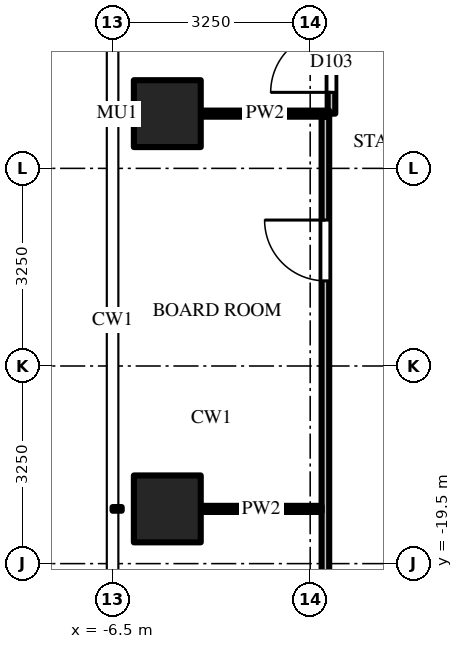
"""IFC4 building model, lengths in metres.
Left out: names, types, materials, properties, quantities, classifications, styles, units other than length and angle.
Written with IfcOpenShell. Run it as: python <this file> out.ifc"""

import sys

from ifc_helpers import new_model, si_unit, direction, frame, frame_2d, origin, origin_2d, place, context, subcontext, project, spatial, rectangle, extrude, source, transform, mapped, element, fill, save


model = new_model("IFC4")
c1 = context("Model", 3, precision=1e-05, world=origin(), true_north=direction((0.0, 1.0)))
c2 = subcontext(c1, "Body", "Model", "MODEL_VIEW")
j1 = project(units=[si_unit("LENGTHUNIT", "METRE"), si_unit("PLANEANGLEUNIT", "RADIAN")], contexts=[c1])
p1 = place(None, origin())
s1 = spatial("IfcSite", under=j1, at=p1, CompositionType="ELEMENT")
p2 = place(p1, origin())
s2 = spatial("IfcBuilding", under=s1, at=p2, CompositionType="ELEMENT")
p3 = place(p2, frame((0.0, 0.0, 232.4)))
s3 = spatial("IfcBuildingStorey", under=s2, at=p3, CompositionType="ELEMENT", Elevation=232.4)
m1 = source(origin(), c2, "Body", "SweptSolid", [
    extrude(rectangle(XDim=1.1, YDim=1.1, at=origin_2d()), origin(), (0.0, 0.0, 1.0), 3.9),
])
for number, where, z_axis, x_axis in (
    (1, (-5.6, -12.1, 0.0), (0.0, 0.0, 1.0), (1.0, 0.0, 0.0)),
    (2, (-5.6, -18.6, 0.0), (0.0, 0.0, 1.0), (1.0, 0.0, 0.0)),
):
    element("IfcColumn", number, at=place(p3, frame(where, z_axis=z_axis, x_axis=x_axis)), inside=s3, PredefinedType="COLUMN", context=c2, shape_type="MappedRepresentation", body=[
        mapped(m1, transform((0.0, 0.0, 0.0))),
    ])
m2 = source(origin(), c2, "Body", "SweptSolid", [
    extrude(rectangle(XDim=8.85, YDim=0.125, at=frame_2d((4.425, 0.0))), origin(), (0.0, 0.0, 1.0), 2.997),
])
p4 = place(p3, frame((-3.0, -21.0, 0.0), z_axis=(0.0, 0.0, 1.0), x_axis=(0.0, 1.0, 0.0)))
e3 = element("IfcWall", 3, at=p4, inside=s3, PredefinedType="PARTITIONING", context=c2, shape_type="MappedRepresentation", body=[
    mapped(m2, transform((0.0, 0.0, 0.0))),
])
m3 = source(origin(), c2, "Body", "SweptSolid", [
    extrude(rectangle(XDim=1.0, YDim=2.1, at=frame_2d((0.5, 1.05))), frame((0.0, 0.073, 0.0), z_axis=(0.0, -1.0, 0.0), x_axis=(1.0, 0.0, 0.0)), (0.0, 0.0, 1.0), 0.145),
])
p5 = place(p4, frame((6.15, 0.0, 0.0)))
e4 = element("IfcOpeningElement", 4, at=p5, cuts=e3, PredefinedType="OPENING", context=c2, shape_type="MappedRepresentation", body=[
    mapped(m3, transform((0.0, 0.0, 0.0))),
])
m4 = source(origin(), c2, "Body", "SweptSolid", [
    extrude(rectangle(XDim=5.538, YDim=0.125, at=frame_2d((2.769, 0.0))), origin(), (0.0, 0.0, 1.0), 2.997),
])
p6 = place(p3, frame((-2.9, -12.1, 0.0), z_axis=(0.0, 0.0, 1.0), x_axis=(0.0, 1.0, 0.0)))
e5 = element("IfcWall", 5, at=p6, inside=s3, PredefinedType="PARTITIONING", context=c2, shape_type="MappedRepresentation", body=[
    mapped(m4, transform((0.0, 0.0, 0.0))),
])
p7 = place(p6, frame((0.35, 0.0, 0.0)))
e6 = element("IfcOpeningElement", 6, at=p7, cuts=e5, PredefinedType="OPENING", context=c2, shape_type="MappedRepresentation", body=[
    mapped(m3, transform((0.0, 0.0, 0.0))),
])
m5 = source(origin(), c2, "Body", "SweptSolid", [
    extrude(rectangle(XDim=1.988, YDim=0.1, at=frame_2d((0.994, 0.0))), origin(), (0.0, 0.0, 1.0), 3.223),
])
p8 = place(p3, frame((-5.05, -18.6, 0.0), z_axis=(0.0, 0.0, 1.0), x_axis=(1.0, 0.0, 0.0)))
e7 = element("IfcWall", 7, at=p8, inside=s3, PredefinedType="PARTITIONING", context=c2, shape_type="MappedRepresentation", body=[
    mapped(m5, transform((0.0, 0.0, 0.0))),
])
m6 = source(origin(), c2, "Body", "SweptSolid", [
    extrude(rectangle(XDim=2.113, YDim=0.1, at=frame_2d((1.056, 0.0))), origin(), (0.0, 0.0, 1.0), 2.997),
])
p9 = place(p3, frame((-5.05, -12.1, 0.0), z_axis=(0.0, 0.0, 1.0), x_axis=(1.0, 0.0, 0.0)))
e8 = element("IfcWall", 8, at=p9, inside=s3, PredefinedType="PARTITIONING", context=c2, shape_type="MappedRepresentation", body=[
    mapped(m6, transform((0.0, 0.0, 0.0))),
])
m7 = source(origin(), c2, "Body", "SweptSolid", [
    extrude(rectangle(XDim=1.0, YDim=2.1, at=frame_2d((0.5, 1.05))), frame((0.0, 0.025, 0.0), z_axis=(0.0, -1.0, 0.0), x_axis=(1.0, 0.0, 0.0)), (0.0, 0.0, 1.0), 0.05),
])
p10 = place(p5, origin())
e9 = element("IfcDoor", 9, at=p10, inside=s3, OperationType="SINGLE_SWING_RIGHT", PredefinedType="DOOR", context=c2, shape_type="MappedRepresentation", body=[
    mapped(m7, transform((0.0, 0.0, 0.0))),
])
fill(e4, e9)
p11 = place(p7, origin())
e10 = element("IfcDoor", 10, at=p11, inside=s3, OperationType="SINGLE_SWING_LEFT", PredefinedType="DOOR", context=c2, shape_type="MappedRepresentation", body=[
    mapped(m7, transform((0.0, 0.0, 0.0))),
])
fill(e6, e10)
save(model, sys.argv[1])
